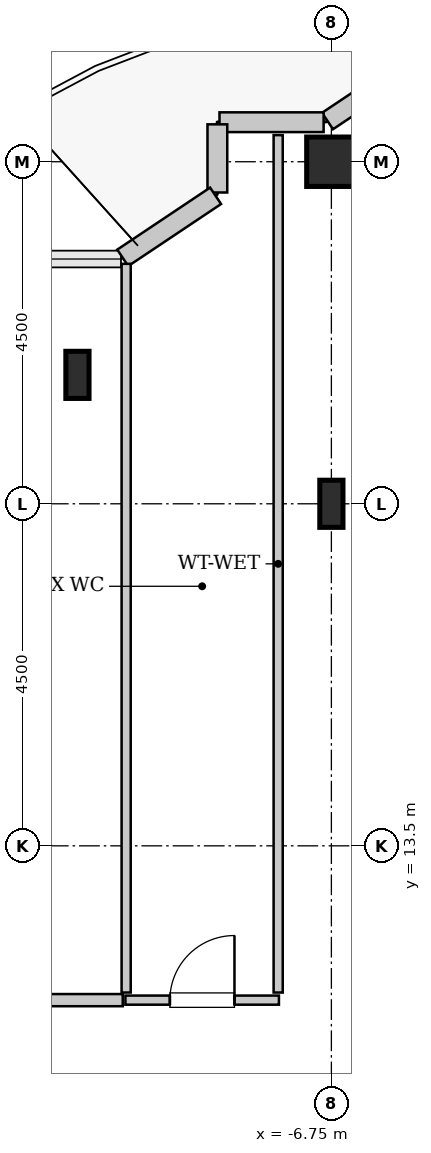
"""IFC4 building model, lengths in metres.
Left out: names, types, materials, properties, quantities, classifications, styles, units other than length and angle.
Written with IfcOpenShell. Run it as: python <this file> out.ifc"""

import sys

from ifc_helpers import new_model, si_unit, direction, frame, frame_2d, origin, origin_2d, place, context, subcontext, project, spatial, rectangle, hollow_rectangle, i_section, extrude, source, transform, mapped, element, fill, save


model = new_model("IFC4")
c1 = context("Model", 3, precision=1e-05, world=origin(), true_north=direction((0.0, 1.0)))
c2 = subcontext(c1, "Body", "Model", "MODEL_VIEW")
j1 = project(units=[si_unit("LENGTHUNIT", "METRE"), si_unit("PLANEANGLEUNIT", "RADIAN")], contexts=[c1])
p1 = place(None, origin())
s1 = spatial("IfcSite", under=j1, at=p1, CompositionType="ELEMENT")
p2 = place(p1, origin())
s2 = spatial("IfcBuilding", under=s1, at=p2, CompositionType="ELEMENT")
p3 = place(p2, frame((0.0, 0.0, 272.2)))
s3 = spatial("IfcBuildingStorey", under=s2, at=p3, CompositionType="ELEMENT", Elevation=272.2)
m1 = source(origin(), c2, "Body", "SweptSolid", [
    extrude(i_section(OverallWidth=0.305, OverallDepth=0.62, WebThickness=0.021, FlangeThickness=0.04, FilletRadius=0.027, at=origin_2d()), origin(), (0.0, 0.0, 1.0), 3.8),
])
for number, where, z_axis, x_axis in (
    (1, (-10.091, 19.696, 0.0), (0.0, 0.0, 1.0), (1.0, 0.0, 0.0)),
    (2, (-6.75, 18.0, 0.0), (0.0, 0.0, 1.0), (1.0, 0.0, 0.0)),
):
    element("IfcColumn", number, at=place(p3, frame(where, z_axis=z_axis, x_axis=x_axis)), inside=s3, PredefinedType="COLUMN", context=c2, shape_type="MappedRepresentation", body=[
        mapped(m1, transform((0.0, 0.0, 0.0), x_axis=(1.0, 0.0, 0.0), y_axis=(0.0, 1.0, 0.0), z_axis=(0.0, 0.0, 1.0), scale=1.0)),
    ])
m2 = source(origin(), c2, "Body", "SweptSolid", [
    extrude(hollow_rectangle(XDim=0.65, YDim=0.65, WallThickness=0.032, InnerFilletRadius=0.032, OuterFilletRadius=0.064, at=origin_2d()), origin(), (0.0, 0.0, 1.0), 3.8),
])
p4 = place(p3, frame((-6.75, 22.5, 0.0), z_axis=(0.0, 0.0, 1.0), x_axis=(1.0, 0.0, 0.0)))
e3 = element("IfcColumn", 3, at=p4, inside=s3, PredefinedType="COLUMN", context=c2, shape_type="MappedRepresentation", body=[
    mapped(m2, transform((0.0, 0.0, 0.0), x_axis=(1.0, 0.0, 0.0), y_axis=(0.0, 1.0, 0.0), z_axis=(0.0, 0.0, 1.0), scale=1.0)),
])
m3 = source(origin(), c2, "Body", "SweptSolid", [
    extrude(rectangle(XDim=0.565, YDim=0.26, at=frame_2d((0.283, 0.0))), origin(), (0.0, 0.0, 1.0), 3.55),
])
p5 = place(p3, frame((-6.331, 23.35, 0.0), z_axis=(0.0, 0.0, 1.0), x_axis=(-0.831651492666, -0.555297933317, 0.0)))
e4 = element("IfcWall", 4, at=p5, inside=s3, PredefinedType="SOLIDWALL", context=c2, shape_type="MappedRepresentation", body=[
    mapped(m3, transform((0.0, 0.0, 0.0), x_axis=(1.0, 0.0, 0.0), y_axis=(0.0, 1.0, 0.0), z_axis=(0.0, 0.0, 1.0), scale=1.0)),
])
m4 = source(origin(), c2, "Body", "SweptSolid", [
    extrude(rectangle(XDim=1.37, YDim=0.26, at=frame_2d((0.685, 0.0))), origin(), (0.0, 0.0, 1.0), 3.55),
])
p6 = place(p3, frame((-6.852, 23.02, 0.0), z_axis=(0.0, 0.0, 1.0), x_axis=(-1.0, 0.0, 0.0)))
e5 = element("IfcWall", 5, at=p6, inside=s3, PredefinedType="SOLIDWALL", context=c2, shape_type="MappedRepresentation", body=[
    mapped(m4, transform((0.0, 0.0, 0.0), x_axis=(1.0, 0.0, 0.0), y_axis=(0.0, 1.0, 0.0), z_axis=(0.0, 0.0, 1.0), scale=1.0)),
])
m5 = source(origin(), c2, "Body", "SweptSolid", [
    extrude(rectangle(XDim=0.897, YDim=0.26, at=frame_2d((0.448, 0.0))), origin(), (0.0, 0.0, 1.0), 3.55),
])
p7 = place(p3, frame((-8.25, 22.992, 0.0), z_axis=(0.0, 0.0, 1.0), x_axis=(0.0, -1.0, 0.0)))
e6 = element("IfcWall", 6, at=p7, inside=s3, PredefinedType="SOLIDWALL", context=c2, shape_type="MappedRepresentation", body=[
    mapped(m5, transform((0.0, 0.0, 0.0), x_axis=(1.0, 0.0, 0.0), y_axis=(0.0, 1.0, 0.0), z_axis=(0.0, 0.0, 1.0), scale=1.0)),
])
m6 = source(origin(), c2, "Body", "SweptSolid", [
    extrude(rectangle(XDim=1.469, YDim=0.26, at=frame_2d((0.734, 0.0))), origin(), (0.0, 0.0, 1.0), 3.55),
])
p8 = place(p3, frame((-8.273, 22.052, 0.0), z_axis=(0.0, 0.0, 1.0), x_axis=(-0.831461760506, -0.555581983884, 0.0)))
e7 = element("IfcWall", 7, at=p8, inside=s3, PredefinedType="SOLIDWALL", context=c2, shape_type="MappedRepresentation", body=[
    mapped(m6, transform((0.0, 0.0, 0.0), x_axis=(1.0, 0.0, 0.0), y_axis=(0.0, 1.0, 0.0), z_axis=(0.0, 0.0, 1.0), scale=1.0)),
])
m7 = source(origin(), c2, "Body", "SweptSolid", [
    extrude(rectangle(XDim=2.02, YDim=0.12, at=frame_2d((1.01, 0.0))), origin(), (0.0, 0.0, 1.0), 3.535),
])
p9 = place(p3, frame((-9.46, 11.47, 0.0), z_axis=(0.0, 0.0, 1.0), x_axis=(1.0, 0.0, 0.0)))
e8 = element("IfcWall", 8, at=p9, inside=s3, PredefinedType="PLUMBINGWALL", context=c2, shape_type="MappedRepresentation", body=[
    mapped(m7, transform((0.0, 0.0, 0.0), x_axis=(1.0, 0.0, 0.0), y_axis=(0.0, 1.0, 0.0), z_axis=(0.0, 0.0, 1.0), scale=1.0)),
])
p10 = place(p9, frame((0.585, 0.0, 0.0)))
e9 = element("IfcOpeningElement", 9, at=p10, cuts=e8, PredefinedType="OPENING", context=c2, shape_type="SweptSolid", body=[
    extrude(rectangle(XDim=0.85, YDim=2.1, at=frame_2d((0.425, 1.05))), frame((0.0, 0.07, 0.0), z_axis=(0.0, -1.0, 0.0), x_axis=(1.0, 0.0, 0.0)), (0.0, 0.0, 1.0), 0.14),
])
m8 = source(origin(), c2, "Body", "SweptSolid", [
    extrude(rectangle(XDim=11.28, YDim=0.12, at=frame_2d((5.64, 0.0))), origin(), (0.0, 0.0, 1.0), 3.535),
])
p11 = place(p3, frame((-7.45, 11.57, 0.0), z_axis=(0.0, 0.0, 1.0), x_axis=(0.0, 1.0, 0.0)))
e10 = element("IfcWall", 10, at=p11, inside=s3, PredefinedType="PLUMBINGWALL", context=c2, shape_type="MappedRepresentation", body=[
    mapped(m8, transform((0.0, 0.0, 0.0), x_axis=(1.0, 0.0, 0.0), y_axis=(0.0, 1.0, 0.0), z_axis=(0.0, 0.0, 1.0), scale=1.0)),
])
m9 = source(origin(), c2, "Body", "SweptSolid", [
    extrude(rectangle(XDim=9.587, YDim=0.12, at=frame_2d((4.793, 0.0))), origin(), (0.0, 0.0, 1.0), 3.535),
])
p12 = place(p3, frame((-9.45, 11.57, 0.0), z_axis=(0.0, 0.0, 1.0), x_axis=(0.0, 1.0, 0.0)))
e11 = element("IfcWall", 11, at=p12, inside=s3, PredefinedType="PLUMBINGWALL", context=c2, shape_type="MappedRepresentation", body=[
    mapped(m9, transform((0.0, 0.0, 0.0), x_axis=(1.0, 0.0, 0.0), y_axis=(0.0, 1.0, 0.0), z_axis=(0.0, 0.0, 1.0), scale=1.0)),
])
m10 = source(origin(), c2, "Body", "SweptSolid", [
    extrude(rectangle(XDim=4.125, YDim=0.16, at=frame_2d((2.062, 0.0))), origin(), (0.0, 0.0, 1.0), 3.535),
])
p13 = place(p3, frame((-13.62, 11.47, 0.0), z_axis=(0.0, 0.0, 1.0), x_axis=(1.0, 0.0, 0.0)))
e12 = element("IfcWall", 12, at=p13, inside=s3, PredefinedType="PARTITIONING", context=c2, shape_type="MappedRepresentation", body=[
    mapped(m10, transform((0.0, 0.0, 0.0), x_axis=(1.0, 0.0, 0.0), y_axis=(0.0, 1.0, 0.0), z_axis=(0.0, 0.0, 1.0), scale=1.0)),
])
p14 = place(p13, frame((1.587, 0.0, 0.0)))
e13 = element("IfcOpeningElement", 13, at=p14, cuts=e12, PredefinedType="OPENING", context=c2, shape_type="SweptSolid", body=[
    extrude(rectangle(XDim=0.95, YDim=2.1, at=frame_2d((0.475, 1.05))), frame((0.0, 0.09, 0.0), z_axis=(0.0, -1.0, 0.0), x_axis=(1.0, 0.0, 0.0)), (0.0, 0.0, 1.0), 0.18),
])
m11 = source(origin(), c2, "Body", "SweptSolid", [
    extrude(rectangle(XDim=0.85, YDim=2.1, at=frame_2d((0.425, 1.05))), frame((0.0, 0.025, 0.0), z_axis=(0.0, -1.0, 0.0), x_axis=(1.0, 0.0, 0.0)), (0.0, 0.0, 1.0), 0.05),
])
p15 = place(p10, origin())
e14 = element("IfcDoor", 14, at=p15, inside=s3, OperationType="SINGLE_SWING_RIGHT", PredefinedType="DOOR", context=c2, shape_type="MappedRepresentation", body=[
    mapped(m11, transform((0.0, 0.0, 0.0), x_axis=(1.0, 0.0, 0.0), y_axis=(0.0, 1.0, 0.0), z_axis=(0.0, 0.0, 1.0), scale=1.0)),
])
fill(e9, e14)
save(model, sys.argv[1])
